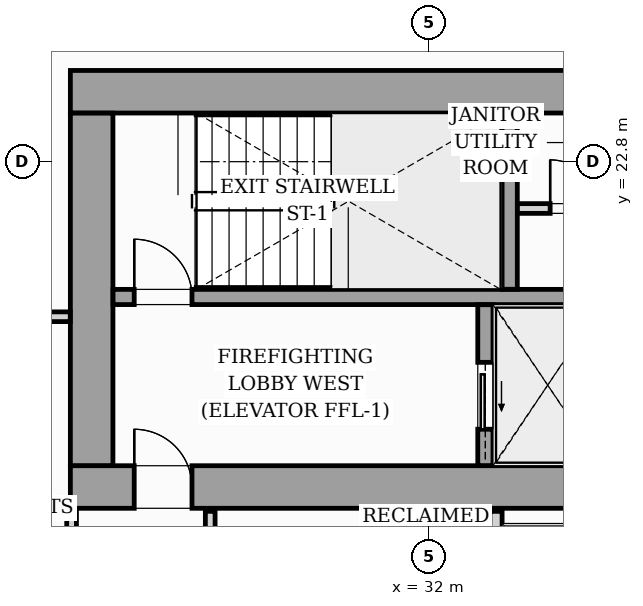
"""IFC4 building model, lengths in metres.
Left out: names, types, materials, properties, quantities, classifications, styles, units other than length and angle.
Written with IfcOpenShell. Run it as: python <this file> out.ifc"""

import sys

from ifc_helpers import new_model, si_unit, direction, frame, frame_2d, origin, origin_2d, place, context, subcontext, project, spatial, rectangle, i_section, extrude, source, transform, mapped, element, fill, save


model = new_model("IFC4")
c1 = context("Model", 3, precision=1e-05, world=origin(), true_north=direction((0.0, 1.0)))
c2 = subcontext(c1, "Body", "Model", "MODEL_VIEW")
j1 = project(units=[si_unit("LENGTHUNIT", "METRE"), si_unit("PLANEANGLEUNIT", "RADIAN")], contexts=[c1])
p1 = place(None, origin())
s1 = spatial("IfcSite", under=j1, at=p1, CompositionType="ELEMENT")
p2 = place(p1, origin())
s2 = spatial("IfcBuilding", under=s1, at=p2, CompositionType="ELEMENT")
p3 = place(p2, frame((0.0, 0.0, 153.4)))
s3 = spatial("IfcBuildingStorey", under=s2, at=p3, CompositionType="ELEMENT", Elevation=153.4)
m1 = source(origin(), c2, "Body", "SweptSolid", [
    extrude(i_section(OverallWidth=0.421, OverallDepth=0.465, WebThickness=0.045, FlangeThickness=0.073, FilletRadius=0.018, at=origin_2d()), origin(), (0.0, 0.0, 1.0), 3.196),
])
for number, where, z_axis, x_axis in (
    (1, (26.4, 17.4, 0.002), (0.0, 0.0, 1.0), (1.0, 0.0, 0.0)),
    (2, (33.12, 17.4, 0.002), (0.0, 0.0, 1.0), (1.0, 0.0, 0.0)),
    (3, (26.4, 24.0, 0.002), (0.0, 0.0, 1.0), (1.0, 0.0, 0.0)),
    (4, (33.12, 24.0, 0.002), (0.0, 0.0, 1.0), (1.0, 0.0, 0.0)),
):
    element("IfcColumn", number, at=place(p3, frame(where, z_axis=z_axis, x_axis=x_axis)), inside=s3, PredefinedType="PILASTER", context=c2, shape_type="MappedRepresentation", body=[
        mapped(m1, transform((0.0, 0.0, 0.0), scale=1.0)),
    ])
p4 = place(p3, frame((26.1, 17.45, 0.0), z_axis=(0.0, 0.0, 1.0), x_axis=(1.0, 0.0, 0.0)))
e5 = element("IfcWall", 5, at=p4, inside=s3, PredefinedType="SHEAR", context=c2, shape_type="SweptSolid", body=[
    extrude(rectangle(XDim=19.8, YDim=0.7, at=frame_2d((9.9, 0.0))), origin(), (0.0, 0.0, 1.0), 3.2),
])
p5 = place(p4, frame((1.05, 0.0, 0.0)))
e6 = element("IfcOpeningElement", 6, at=p5, cuts=e5, PredefinedType="OPENING", context=c2, shape_type="SweptSolid", body=[
    extrude(rectangle(XDim=0.95, YDim=2.06, at=frame_2d((0.475, 1.03))), frame((0.0, 0.36, 0.0), z_axis=(0.0, -1.0, 0.0), x_axis=(1.0, 0.0, 0.0)), (0.0, 0.0, 1.0), 0.72),
])
p6 = place(p4, frame((9.48, 0.0, 0.0)))
e7 = element("IfcOpeningElement", 7, at=p6, cuts=e5, PredefinedType="OPENING", context=c2, shape_type="SweptSolid", body=[
    extrude(rectangle(XDim=0.85, YDim=2.0, at=frame_2d((0.425, 1.0))), frame((0.0, 0.36, 0.0), z_axis=(0.0, -1.0, 0.0), x_axis=(1.0, 0.0, 0.0)), (0.0, 0.0, 1.0), 0.72),
])
p7 = place(p4, frame((17.65, 0.0, 0.0)))
e8 = element("IfcOpeningElement", 8, at=p7, cuts=e5, PredefinedType="OPENING", context=c2, shape_type="SweptSolid", body=[
    extrude(rectangle(XDim=0.95, YDim=2.06, at=frame_2d((0.475, 1.03))), frame((0.0, 0.36, 0.0), z_axis=(0.0, -1.0, 0.0), x_axis=(1.0, 0.0, 0.0)), (0.0, 0.0, 1.0), 0.72),
])
p8 = place(p3, frame((26.1, 23.95, 0.0), z_axis=(0.0, 0.0, 1.0), x_axis=(1.0, 0.0, 0.0)))
e9 = element("IfcWall", 9, at=p8, inside=s3, PredefinedType="SHEAR", context=c2, shape_type="SweptSolid", body=[
    extrude(rectangle(XDim=19.8, YDim=0.7, at=frame_2d((9.9, 0.0))), origin(), (0.0, 0.0, 1.0), 3.2),
])
p9 = place(p3, frame((26.45, 17.802, 0.0), z_axis=(0.0, 0.0, 1.0), x_axis=(0.0, 1.0, 0.0)))
e10 = element("IfcWall", 10, at=p9, inside=s3, PredefinedType="SHEAR", context=c2, shape_type="SweptSolid", body=[
    extrude(rectangle(XDim=5.796, YDim=0.7, at=frame_2d((2.898, 0.0))), origin(), (0.0, 0.0, 1.0), 3.2),
])
p10 = place(p3, frame((26.802, 20.575, 0.0), z_axis=(0.0, 0.0, 1.0), x_axis=(1.0, 0.0, 0.0)))
e11 = element("IfcWall", 11, at=p10, inside=s3, PredefinedType="SOLIDWALL", context=c2, shape_type="SweptSolid", body=[
    extrude(rectangle(XDim=8.148, YDim=0.25, at=frame_2d((4.074, 0.0))), origin(), (0.0, 0.0, 1.0), 3.2),
])
p11 = place(p10, frame((0.348, 0.0, 0.0)))
e12 = element("IfcOpeningElement", 12, at=p11, cuts=e11, PredefinedType="OPENING", context=c2, shape_type="SweptSolid", body=[
    extrude(rectangle(XDim=0.95, YDim=2.06, at=frame_2d((0.475, 1.03))), frame((0.0, 0.135, 0.0), z_axis=(0.0, -1.0, 0.0), x_axis=(1.0, 0.0, 0.0)), (0.0, 0.0, 1.0), 0.27),
])
p12 = place(p3, frame((33.325, 20.702, 0.0), z_axis=(0.0, 0.0, 1.0), x_axis=(0.0, 1.0, 0.0)))
e13 = element("IfcWall", 13, at=p12, inside=s3, PredefinedType="SOLIDWALL", context=c2, shape_type="SweptSolid", body=[
    extrude(rectangle(XDim=2.896, YDim=0.25, at=frame_2d((1.448, 0.0))), origin(), (0.0, 0.0, 1.0), 3.2),
])
p13 = place(p3, frame((32.925, 17.802, 0.0), z_axis=(0.0, 0.0, 1.0), x_axis=(0.0, 1.0, 0.0)))
e14 = element("IfcWall", 14, at=p13, inside=s3, PredefinedType="SOLIDWALL", context=c2, shape_type="SweptSolid", body=[
    extrude(rectangle(XDim=2.646, YDim=0.25, at=frame_2d((1.323, 0.0))), origin(), (0.0, 0.0, 1.0), 3.2),
])
p14 = place(p13, frame((0.598, 0.0, 0.0)))
e15 = element("IfcOpeningElement", 15, at=p14, cuts=e14, PredefinedType="OPENING", context=c2, shape_type="SweptSolid", body=[
    extrude(rectangle(XDim=1.1, YDim=2.08, at=frame_2d((0.55, 1.04))), frame((0.0, 0.135, 0.0), z_axis=(0.0, -1.0, 0.0), x_axis=(1.0, 0.0, 0.0)), (0.0, 0.0, 1.0), 0.27),
])
p15 = place(p3, frame((33.452, 22.03, 0.0), z_axis=(0.0, 0.0, 1.0), x_axis=(1.0, 0.0, 0.0)))
e16 = element("IfcWall", 16, at=p15, inside=s3, PredefinedType="PARTITIONING", context=c2, shape_type="SweptSolid", body=[
    extrude(rectangle(XDim=5.096, YDim=0.16, at=frame_2d((2.548, 0.0))), origin(), (0.0, 0.0, 1.0), 2.94),
])
p16 = place(p15, frame((0.538, 0.0, 0.0)))
e17 = element("IfcOpeningElement", 17, at=p16, cuts=e16, PredefinedType="OPENING", context=c2, shape_type="SweptSolid", body=[
    extrude(rectangle(XDim=0.8, YDim=2.05, at=frame_2d((0.4, 1.025))), frame((0.0, 0.09, 0.0), z_axis=(0.0, -1.0, 0.0), x_axis=(1.0, 0.0, 0.0)), (0.0, 0.0, 1.0), 0.18),
])
p17 = place(p15, frame((3.158, 0.0, 0.0)))
e18 = element("IfcOpeningElement", 18, at=p17, cuts=e16, PredefinedType="OPENING", context=c2, shape_type="SweptSolid", body=[
    extrude(rectangle(XDim=0.8, YDim=2.05, at=frame_2d((0.4, 1.025))), frame((0.0, 0.09, 0.0), z_axis=(0.0, -1.0, 0.0), x_axis=(1.0, 0.0, 0.0)), (0.0, 0.0, 1.0), 0.18),
])
p18 = place(p3, frame((28.4, 14.75, 0.0), z_axis=(0.0, 0.0, 1.0), x_axis=(0.0, 1.0, 0.0)))
e19 = element("IfcWall", 19, at=p18, inside=s3, PredefinedType="PARTITIONING", context=c2, shape_type="SweptSolid", body=[
    extrude(rectangle(XDim=2.3, YDim=0.16, at=frame_2d((1.15, 0.0))), origin(), (0.0, 0.0, 1.0), 2.94),
])
p19 = place(p3, frame((33.1, 14.75, 0.0), z_axis=(0.0, 0.0, 1.0), x_axis=(0.0, 1.0, 0.0)))
e20 = element("IfcWall", 20, at=p19, inside=s3, PredefinedType="PARTITIONING", context=c2, shape_type="SweptSolid", body=[
    extrude(rectangle(XDim=2.3, YDim=0.2, at=frame_2d((1.15, 0.0))), origin(), (0.0, 0.0, 1.0), 2.94),
])
p20 = place(p3, frame((24.182, 20.25, 0.0), z_axis=(0.0, 0.0, 1.0), x_axis=(1.0, 0.0, 0.0)))
e21 = element("IfcWall", 21, at=p20, inside=s3, PredefinedType="PARTITIONING", context=c2, shape_type="SweptSolid", body=[
    extrude(rectangle(XDim=1.916, YDim=0.16, at=frame_2d((0.958, 0.0))), origin(), (0.0, 0.0, 1.0), 2.94),
])
p21 = place(p3, frame((26.12, 14.66, 0.0), z_axis=(0.0, 0.0, 1.0), x_axis=(0.0, 1.0, 0.0)))
e22 = element("IfcWall", 22, at=p21, inside=s3, PredefinedType="PARTITIONING", context=c2, shape_type="SweptSolid", body=[
    extrude(rectangle(XDim=2.438, YDim=0.16, at=frame_2d((1.219, 0.0))), origin(), (0.0, 0.0, 1.0), 2.94),
])
m2 = source(origin(), c2, "Body", "SweptSolid", [
    extrude(rectangle(XDim=0.95, YDim=2.06, at=frame_2d((0.475, 1.03))), frame((0.0, 0.025, 0.0), z_axis=(0.0, -1.0, 0.0), x_axis=(1.0, 0.0, 0.0)), (0.0, 0.0, 1.0), 0.05),
])
p22 = place(p5, origin())
e23 = element("IfcDoor", 23, at=p22, inside=s3, OperationType="SINGLE_SWING_LEFT", PredefinedType="DOOR", context=c2, shape_type="MappedRepresentation", body=[
    mapped(m2, transform((0.0, 0.0, 0.0), scale=1.0)),
])
fill(e6, e23)
p23 = place(p11, origin())
e24 = element("IfcDoor", 24, at=p23, inside=s3, OperationType="SINGLE_SWING_LEFT", PredefinedType="DOOR", context=c2, shape_type="MappedRepresentation", body=[
    mapped(m2, transform((0.0, 0.0, 0.0), scale=1.0)),
])
fill(e12, e24)
m3 = source(origin(), c2, "Body", "SweptSolid", [
    extrude(rectangle(XDim=1.1, YDim=2.08, at=frame_2d((0.55, 1.04))), frame((0.0, 0.025, 0.0), z_axis=(0.0, -1.0, 0.0), x_axis=(1.0, 0.0, 0.0)), (0.0, 0.0, 1.0), 0.05),
])
p24 = place(p14, origin())
e25 = element("IfcDoor", 25, at=p24, inside=s3, OperationType="SLIDING_TO_LEFT", PredefinedType="DOOR", context=c2, shape_type="MappedRepresentation", body=[
    mapped(m3, transform((0.0, 0.0, 0.0), scale=1.0)),
])
fill(e15, e25)
m4 = source(origin(), c2, "Body", "SweptSolid", [
    extrude(rectangle(XDim=0.8, YDim=2.05, at=frame_2d((0.4, 1.025))), frame((0.0, 0.025, 0.0), z_axis=(0.0, -1.0, 0.0), x_axis=(1.0, 0.0, 0.0)), (0.0, 0.0, 1.0), 0.05),
])
p25 = place(p16, origin())
e26 = element("IfcDoor", 26, at=p25, inside=s3, OperationType="SINGLE_SWING_LEFT", PredefinedType="DOOR", context=c2, shape_type="MappedRepresentation", body=[
    mapped(m4, transform((0.0, 0.0, 0.0), scale=1.0)),
])
fill(e17, e26)
save(model, sys.argv[1])
